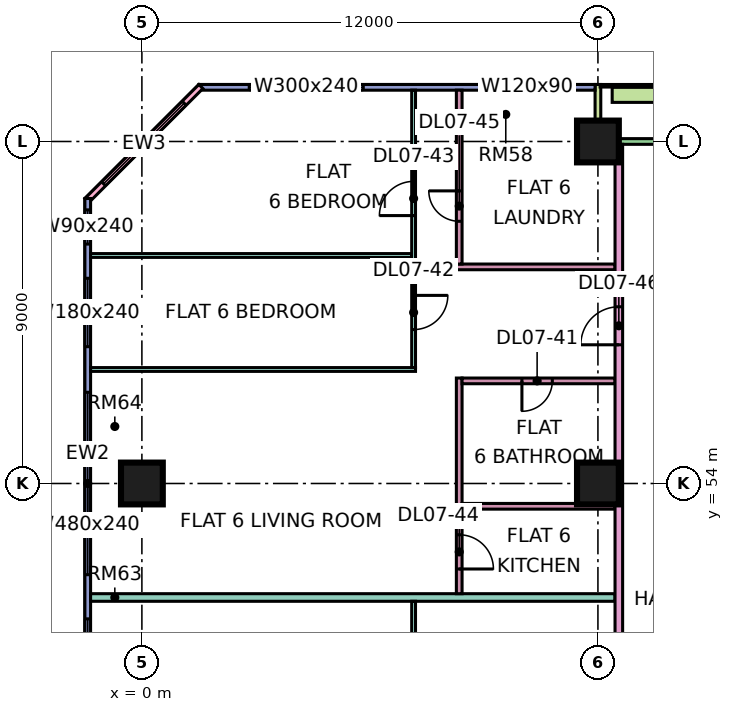
"""IFC4 building model, lengths in metres.
Left out: names, types, materials, properties, quantities, classifications, styles, units other than length and angle.
Written with IfcOpenShell. Run it as: python <this file> out.ifc"""

import sys

from ifc_helpers import new_model, si_unit, direction, frame, frame_2d, origin, origin_2d, place, context, subcontext, project, spatial, rectangle, extrude, element, fill, save


model = new_model("IFC4")
c1 = context("Model", 3, precision=1e-05, world=origin(), true_north=direction((0.0, 1.0)))
c2 = subcontext(c1, "Body", "Model", "MODEL_VIEW")
j1 = project(units=[si_unit("LENGTHUNIT", "METRE"), si_unit("PLANEANGLEUNIT", "RADIAN")], contexts=[c1])
p1 = place(None, origin())
s1 = spatial("IfcSite", under=j1, at=p1, CompositionType="ELEMENT")
p2 = place(p1, origin())
s2 = spatial("IfcBuilding", under=s1, at=p2, CompositionType="ELEMENT")
p3 = place(p2, frame((0.0, 0.0, 41.4)))
s3 = spatial("IfcBuildingStorey", under=s2, at=p3, CompositionType="ELEMENT", Elevation=41.4)
for number, where, z_axis, x_axis in (
    (1, (0.0, 54.0, 0.0), (0.0, 0.0, 1.0), (1.0, 0.0, 0.0)),
    (2, (12.0, 54.0, 0.0), (0.0, 0.0, 1.0), (1.0, 0.0, 0.0)),
    (3, (12.0, 63.0, 0.0), (0.0, 0.0, 1.0), (1.0, 0.0, 0.0)),
):
    element("IfcColumn", number, at=place(p3, frame(where, z_axis=z_axis, x_axis=x_axis)), inside=s3, PredefinedType="COLUMN", context=c2, shape_type="SweptSolid", body=[
        extrude(rectangle(XDim=1.1, YDim=1.1, at=origin_2d()), origin(), (0.0, 0.0, 1.0), 3.75),
    ])
p4 = place(p3, frame((22.425, 63.0, 0.0), z_axis=(0.0, 0.0, 1.0), x_axis=(-1.0, 0.0, 0.0)))
e4 = element("IfcWall", 4, at=p4, inside=s3, PredefinedType="SOLIDWALL", context=c2, shape_type="SweptSolid", body=[
    extrude(rectangle(XDim=10.35, YDim=0.15, at=frame_2d((5.175, 0.0))), origin(), (0.0, 0.0, 1.0), 3.35),
])
p5 = place(p4, frame((0.562, 0.0, 0.45)))
e5 = element("IfcOpeningElement", 5, at=p5, cuts=e4, PredefinedType="OPENING", context=c2, shape_type="SweptSolid", body=[
    extrude(rectangle(XDim=1.2, YDim=2.4, at=frame_2d((0.6, 1.2))), frame((0.0, 0.085, 0.0), z_axis=(0.0, -1.0, 0.0), x_axis=(1.0, 0.0, 0.0)), (0.0, 0.0, 1.0), 0.17),
])
p6 = place(p4, frame((3.975, 0.0, 0.45)))
e6 = element("IfcOpeningElement", 6, at=p6, cuts=e4, PredefinedType="OPENING", context=c2, shape_type="SweptSolid", body=[
    extrude(rectangle(XDim=2.4, YDim=2.4, at=frame_2d((1.2, 1.2))), frame((0.0, 0.085, 0.0), z_axis=(0.0, -1.0, 0.0), x_axis=(1.0, 0.0, 0.0)), (0.0, 0.0, 1.0), 0.17),
])
p7 = place(p3, frame((12.0, 64.5, 0.0), z_axis=(0.0, 0.0, 1.0), x_axis=(0.0, -1.0, 0.0)))
e7 = element("IfcWall", 7, at=p7, inside=s3, PredefinedType="SOLIDWALL", context=c2, shape_type="SweptSolid", body=[
    extrude(rectangle(XDim=1.5, YDim=0.15, at=frame_2d((0.75, 0.0))), origin(), (0.0, 0.0, 1.0), 3.35),
])
p8 = place(p3, frame((11.925, 64.425, 0.0), z_axis=(0.0, 0.0, 1.0), x_axis=(-1.0, 0.0, 0.0)))
e8 = element("IfcWall", 8, at=p8, inside=s3, PredefinedType="SOLIDWALL", context=c2, shape_type="SweptSolid", body=[
    extrude(rectangle(XDim=10.425, YDim=0.15, at=frame_2d((5.212, 0.0))), origin(), (0.0, 0.0, 1.0), 3.35),
])
p9 = place(p8, frame((1.188, 0.0, 1.7)))
e9 = element("IfcOpeningElement", 9, at=p9, cuts=e8, PredefinedType="OPENING", context=c2, shape_type="SweptSolid", body=[
    extrude(rectangle(XDim=1.2, YDim=0.9, at=frame_2d((0.6, 0.45))), frame((0.0, 0.085, 0.0), z_axis=(0.0, -1.0, 0.0), x_axis=(1.0, 0.0, 0.0)), (0.0, 0.0, 1.0), 0.17),
])
p10 = place(p8, frame((6.1, 0.0, 0.45)))
e10 = element("IfcOpeningElement", 10, at=p10, cuts=e8, PredefinedType="OPENING", context=c2, shape_type="SweptSolid", body=[
    extrude(rectangle(XDim=3.0, YDim=2.4, at=frame_2d((1.5, 1.2))), frame((0.0, 0.085, 0.0), z_axis=(0.0, -1.0, 0.0), x_axis=(1.0, 0.0, 0.0)), (0.0, 0.0, 1.0), 0.17),
])
p11 = place(p3, frame((1.553, 64.447, 0.0), z_axis=(0.0, 0.0, 1.0), x_axis=(-0.707106781187, -0.707106781187, 0.0)))
e11 = element("IfcWall", 11, at=p11, inside=s3, PredefinedType="SOLIDWALL", context=c2, shape_type="SweptSolid", body=[
    extrude(rectangle(XDim=4.243, YDim=0.15, at=frame_2d((2.121, 0.0))), origin(), (0.0, 0.0, 1.0), 3.35),
])
p12 = place(p11, frame((0.621, 0.0, 0.45)))
e12 = element("IfcOpeningElement", 12, at=p12, cuts=e11, PredefinedType="OPENING", context=c2, shape_type="SweptSolid", body=[
    extrude(rectangle(XDim=3.0, YDim=2.4, at=frame_2d((1.5, 1.2))), frame((0.0, 0.085, 0.0), z_axis=(0.0, -1.0, 0.0), x_axis=(1.0, 0.0, 0.0)), (0.0, 0.0, 1.0), 0.17),
])
p13 = place(p3, frame((-1.425, 61.5, 0.0), z_axis=(0.0, 0.0, 1.0), x_axis=(0.0, -1.0, 0.0)))
e13 = element("IfcWall", 13, at=p13, inside=s3, PredefinedType="SOLIDWALL", context=c2, shape_type="SweptSolid", body=[
    extrude(rectangle(XDim=13.425, YDim=0.15, at=frame_2d((6.712, 0.0))), origin(), (0.0, 0.0, 1.0), 3.35),
])
p14 = place(p13, frame((0.3, 0.0, 0.45)))
e14 = element("IfcOpeningElement", 14, at=p14, cuts=e13, PredefinedType="OPENING", context=c2, shape_type="SweptSolid", body=[
    extrude(rectangle(XDim=0.9, YDim=2.4, at=frame_2d((0.45, 1.2))), frame((0.0, 0.085, 0.0), z_axis=(0.0, -1.0, 0.0), x_axis=(1.0, 0.0, 0.0)), (0.0, 0.0, 1.0), 0.17),
])
p15 = place(p13, frame((2.1, 0.0, 0.45)))
e15 = element("IfcOpeningElement", 15, at=p15, cuts=e13, PredefinedType="OPENING", context=c2, shape_type="SweptSolid", body=[
    extrude(rectangle(XDim=1.8, YDim=2.4, at=frame_2d((0.9, 1.2))), frame((0.0, 0.085, 0.0), z_axis=(0.0, -1.0, 0.0), x_axis=(1.0, 0.0, 0.0)), (0.0, 0.0, 1.0), 0.17),
])
p16 = place(p13, frame((5.1, 0.0, 0.45)))
e16 = element("IfcOpeningElement", 16, at=p16, cuts=e13, PredefinedType="OPENING", context=c2, shape_type="SweptSolid", body=[
    extrude(rectangle(XDim=4.8, YDim=2.4, at=frame_2d((2.4, 1.2))), frame((0.0, 0.085, 0.0), z_axis=(0.0, -1.0, 0.0), x_axis=(1.0, 0.0, 0.0)), (0.0, 0.0, 1.0), 0.17),
])
p17 = place(p13, frame((11.062, 0.0, 0.45)))
e17 = element("IfcOpeningElement", 17, at=p17, cuts=e13, PredefinedType="OPENING", context=c2, shape_type="SweptSolid", body=[
    extrude(rectangle(XDim=1.8, YDim=2.4, at=frame_2d((0.9, 1.2))), frame((0.0, 0.085, 0.0), z_axis=(0.0, -1.0, 0.0), x_axis=(1.0, 0.0, 0.0)), (0.0, 0.0, 1.0), 0.17),
])
p18 = place(p3, frame((22.125, 64.229, 0.0), z_axis=(0.0, 0.0, 1.0), x_axis=(-1.0, 0.0, 0.0)))
e18 = element("IfcWall", 18, at=p18, inside=s3, PredefinedType="SOLIDWALL", context=c2, shape_type="SweptSolid", body=[
    extrude(rectangle(XDim=9.75, YDim=0.4, at=frame_2d((4.875, 0.0))), origin(), (0.0, 0.0, 1.0), 0.7),
])
p19 = place(p3, frame((-1.351, 60.0, 0.0), z_axis=(0.0, 0.0, 1.0), x_axis=(1.0, 0.0, 0.0)))
e19 = element("IfcWall", 19, at=p19, inside=s3, PredefinedType="PARTITIONING", context=c2, shape_type="SweptSolid", body=[
    extrude(rectangle(XDim=8.451, YDim=0.1, at=frame_2d((4.226, 0.0))), origin(), (0.0, 0.0, 1.0), 3.35),
])
p20 = place(p3, frame((-1.35, 51.0, 0.0), z_axis=(0.0, 0.0, 1.0), x_axis=(1.0, 0.0, 0.0)))
e20 = element("IfcWall", 20, at=p20, inside=s3, PredefinedType="PARTITIONING", context=c2, shape_type="SweptSolid", body=[
    extrude(rectangle(XDim=13.8, YDim=0.2, at=frame_2d((6.9, 0.0))), origin(), (0.0, 0.0, 1.0), 3.35),
])
p21 = place(p3, frame((-1.35, 57.0, 0.0), z_axis=(0.0, 0.0, 1.0), x_axis=(1.0, 0.0, 0.0)))
e21 = element("IfcWall", 21, at=p21, inside=s3, PredefinedType="PARTITIONING", context=c2, shape_type="SweptSolid", body=[
    extrude(rectangle(XDim=8.55, YDim=0.1, at=frame_2d((4.275, 0.0))), origin(), (0.0, 0.0, 1.0), 3.35),
])
p22 = place(p3, frame((7.15, 47.45, 0.0), z_axis=(0.0, 0.0, 1.0), x_axis=(0.0, 1.0, 0.0)))
e22 = element("IfcWall", 22, at=p22, inside=s3, PredefinedType="PARTITIONING", context=c2, shape_type="SweptSolid", body=[
    extrude(rectangle(XDim=3.45, YDim=0.1, at=frame_2d((1.725, 0.0))), origin(), (0.0, 0.0, 1.0), 3.35),
])
p23 = place(p3, frame((7.15, 57.05, 0.0), z_axis=(0.0, 0.0, 1.0), x_axis=(0.0, 1.0, 0.0)))
e23 = element("IfcWall", 23, at=p23, inside=s3, PredefinedType="PARTITIONING", context=c2, shape_type="SweptSolid", body=[
    extrude(rectangle(XDim=7.3, YDim=0.1, at=frame_2d((3.65, 0.0))), origin(), (0.0, 0.0, 1.0), 3.35),
])
p24 = place(p23, frame((1.0, 0.0, 0.0)))
e24 = element("IfcOpeningElement", 24, at=p24, cuts=e23, PredefinedType="OPENING", context=c2, shape_type="SweptSolid", body=[
    extrude(rectangle(XDim=0.9, YDim=2.1, at=frame_2d((0.45, 1.05))), frame((0.0, 0.06, 0.0), z_axis=(0.0, -1.0, 0.0), x_axis=(1.0, 0.0, 0.0)), (0.0, 0.0, 1.0), 0.12),
])
p25 = place(p23, frame((4.0, 0.0, 0.0)))
e25 = element("IfcOpeningElement", 25, at=p25, cuts=e23, PredefinedType="OPENING", context=c2, shape_type="SweptSolid", body=[
    extrude(rectangle(XDim=0.9, YDim=2.1, at=frame_2d((0.45, 1.05))), frame((0.0, 0.06, 0.0), z_axis=(0.0, -1.0, 0.0), x_axis=(1.0, 0.0, 0.0)), (0.0, 0.0, 1.0), 0.12),
])
p26 = place(p3, frame((8.275, 59.7, 0.0), z_axis=(0.0, 0.0, 1.0), x_axis=(1.0, 0.0, 0.0)))
e26 = element("IfcWall", 26, at=p26, inside=s3, PredefinedType="PARTITIONING", context=c2, shape_type="SweptSolid", body=[
    extrude(rectangle(XDim=4.175, YDim=0.15, at=frame_2d((2.087, 0.0))), origin(), (0.0, 0.0, 1.0), 3.35),
])
p27 = place(p3, frame((8.35, 51.1, 0.0), z_axis=(0.0, 0.0, 1.0), x_axis=(0.0, 1.0, 0.0)))
e27 = element("IfcWall", 27, at=p27, inside=s3, PredefinedType="PARTITIONING", context=c2, shape_type="SweptSolid", body=[
    extrude(rectangle(XDim=5.675, YDim=0.15, at=frame_2d((2.837, 0.0))), origin(), (0.0, 0.0, 1.0), 3.35),
])
p28 = place(p27, frame((0.65, 0.0, 0.0)))
e28 = element("IfcOpeningElement", 28, at=p28, cuts=e27, PredefinedType="OPENING", context=c2, shape_type="SweptSolid", body=[
    extrude(rectangle(XDim=0.9, YDim=2.1, at=frame_2d((0.45, 1.05))), frame((0.0, 0.085, 0.0), z_axis=(0.0, -1.0, 0.0), x_axis=(1.0, 0.0, 0.0)), (0.0, 0.0, 1.0), 0.17),
])
p29 = place(p3, frame((8.35, 59.775, 0.0), z_axis=(0.0, 0.0, 1.0), x_axis=(0.0, 1.0, 0.0)))
e29 = element("IfcWall", 29, at=p29, inside=s3, PredefinedType="PARTITIONING", context=c2, shape_type="SweptSolid", body=[
    extrude(rectangle(XDim=4.575, YDim=0.15, at=frame_2d((2.288, 0.0))), origin(), (0.0, 0.0, 1.0), 3.35),
])
p30 = place(p29, frame((1.125, 0.0, 0.0)))
e30 = element("IfcOpeningElement", 30, at=p30, cuts=e29, PredefinedType="OPENING", context=c2, shape_type="SweptSolid", body=[
    extrude(rectangle(XDim=0.8, YDim=2.1, at=frame_2d((0.4, 1.05))), frame((0.0, 0.085, 0.0), z_axis=(0.0, -1.0, 0.0), x_axis=(1.0, 0.0, 0.0)), (0.0, 0.0, 1.0), 0.17),
])
p31 = place(p3, frame((8.425, 53.4, 0.0), z_axis=(0.0, 0.0, 1.0), x_axis=(1.0, 0.0, 0.0)))
e31 = element("IfcWall", 31, at=p31, inside=s3, PredefinedType="PARTITIONING", context=c2, shape_type="SweptSolid", body=[
    extrude(rectangle(XDim=4.025, YDim=0.15, at=frame_2d((2.012, 0.0))), origin(), (0.0, 0.0, 1.0), 3.35),
])
p32 = place(p3, frame((8.425, 56.7, 0.0), z_axis=(0.0, 0.0, 1.0), x_axis=(1.0, 0.0, 0.0)))
e32 = element("IfcWall", 32, at=p32, inside=s3, PredefinedType="PARTITIONING", context=c2, shape_type="SweptSolid", body=[
    extrude(rectangle(XDim=4.025, YDim=0.15, at=frame_2d((2.012, 0.0))), origin(), (0.0, 0.0, 1.0), 3.35),
])
p33 = place(p32, frame((1.575, 0.0, 0.0)))
e33 = element("IfcOpeningElement", 33, at=p33, cuts=e32, PredefinedType="OPENING", context=c2, shape_type="SweptSolid", body=[
    extrude(rectangle(XDim=0.8, YDim=2.1, at=frame_2d((0.4, 1.05))), frame((0.0, 0.085, 0.0), z_axis=(0.0, -1.0, 0.0), x_axis=(1.0, 0.0, 0.0)), (0.0, 0.0, 1.0), 0.17),
])
p34 = place(p3, frame((12.55, 20.0, 0.0), z_axis=(0.0, 0.0, 1.0), x_axis=(0.0, 1.0, 0.0)))
e34 = element("IfcWall", 34, at=p34, inside=s3, PredefinedType="PARTITIONING", context=c2, shape_type="SweptSolid", body=[
    extrude(rectangle(XDim=42.926, YDim=0.2, at=frame_2d((21.463, 0.0))), origin(), (0.0, 0.0, 1.0), 3.35),
])
p35 = place(p34, frame((25.8, 0.0, 0.0)))
e35 = element("IfcOpeningElement", 35, at=p35, cuts=e34, PredefinedType="OPENING", context=c2, shape_type="SweptSolid", body=[
    extrude(rectangle(XDim=1.0, YDim=2.1, at=frame_2d((0.5, 1.05))), frame((0.0, 0.11, 0.0), z_axis=(0.0, -1.0, 0.0), x_axis=(1.0, 0.0, 0.0)), (0.0, 0.0, 1.0), 0.22),
])
p36 = place(p34, frame((37.65, 0.0, 0.0)))
e36 = element("IfcOpeningElement", 36, at=p36, cuts=e34, PredefinedType="OPENING", context=c2, shape_type="SweptSolid", body=[
    extrude(rectangle(XDim=1.0, YDim=2.1, at=frame_2d((0.5, 1.05))), frame((0.0, 0.11, 0.0), z_axis=(0.0, -1.0, 0.0), x_axis=(1.0, 0.0, 0.0)), (0.0, 0.0, 1.0), 0.22),
])
p37 = place(p34, frame((0.6, 0.0, 0.0)))
e37 = element("IfcOpeningElement", 37, at=p37, cuts=e34, PredefinedType="OPENING", context=c2, shape_type="SweptSolid", body=[
    extrude(rectangle(XDim=1.2, YDim=2.1, at=frame_2d((0.6, 1.05))), frame((0.0, 0.11, 0.0), z_axis=(0.0, -1.0, 0.0), x_axis=(1.0, 0.0, 0.0)), (0.0, 0.0, 1.0), 0.22),
])
p38 = place(p34, frame((4.65, 0.0, 0.0)))
e38 = element("IfcOpeningElement", 38, at=p38, cuts=e34, PredefinedType="OPENING", context=c2, shape_type="SweptSolid", body=[
    extrude(rectangle(XDim=1.0, YDim=2.1, at=frame_2d((0.5, 1.05))), frame((0.0, 0.11, 0.0), z_axis=(0.0, -1.0, 0.0), x_axis=(1.0, 0.0, 0.0)), (0.0, 0.0, 1.0), 0.22),
])
p39 = place(p9, origin())
e39 = element("IfcWindow", 39, at=p39, inside=s3, PartitioningType="SINGLE_PANEL", PredefinedType="WINDOW", context=c2, shape_type="SweptSolid", body=[
    extrude(rectangle(XDim=1.2, YDim=0.9, at=frame_2d((0.6, 0.45))), frame((0.0, 0.03, 0.0), z_axis=(0.0, -1.0, 0.0), x_axis=(1.0, 0.0, 0.0)), (0.0, 0.0, 1.0), 0.06),
])
fill(e9, e39)
p40 = place(p10, origin())
e40 = element("IfcWindow", 40, at=p40, inside=s3, PartitioningType="SINGLE_PANEL", PredefinedType="WINDOW", context=c2, shape_type="SweptSolid", body=[
    extrude(rectangle(XDim=3.0, YDim=2.4, at=frame_2d((1.5, 1.2))), frame((0.0, 0.03, 0.0), z_axis=(0.0, -1.0, 0.0), x_axis=(1.0, 0.0, 0.0)), (0.0, 0.0, 1.0), 0.06),
])
fill(e10, e40)
p41 = place(p12, origin())
e41 = element("IfcWindow", 41, at=p41, inside=s3, PartitioningType="SINGLE_PANEL", PredefinedType="WINDOW", context=c2, shape_type="SweptSolid", body=[
    extrude(rectangle(XDim=3.0, YDim=2.4, at=frame_2d((1.5, 1.2))), frame((0.0, 0.03, 0.0), z_axis=(0.0, -1.0, 0.0), x_axis=(1.0, 0.0, 0.0)), (0.0, 0.0, 1.0), 0.06),
])
fill(e12, e41)
p42 = place(p14, origin())
e42 = element("IfcWindow", 42, at=p42, inside=s3, PartitioningType="SINGLE_PANEL", PredefinedType="WINDOW", context=c2, shape_type="SweptSolid", body=[
    extrude(rectangle(XDim=0.9, YDim=2.4, at=frame_2d((0.45, 1.2))), frame((0.0, 0.03, 0.0), z_axis=(0.0, -1.0, 0.0), x_axis=(1.0, 0.0, 0.0)), (0.0, 0.0, 1.0), 0.06),
])
fill(e14, e42)
p43 = place(p15, origin())
e43 = element("IfcWindow", 43, at=p43, inside=s3, PartitioningType="SINGLE_PANEL", PredefinedType="WINDOW", context=c2, shape_type="SweptSolid", body=[
    extrude(rectangle(XDim=1.8, YDim=2.4, at=frame_2d((0.9, 1.2))), frame((0.0, 0.03, 0.0), z_axis=(0.0, -1.0, 0.0), x_axis=(1.0, 0.0, 0.0)), (0.0, 0.0, 1.0), 0.06),
])
fill(e15, e43)
p44 = place(p16, origin())
e44 = element("IfcWindow", 44, at=p44, inside=s3, PartitioningType="SINGLE_PANEL", PredefinedType="WINDOW", context=c2, shape_type="SweptSolid", body=[
    extrude(rectangle(XDim=4.8, YDim=2.4, at=frame_2d((2.4, 1.2))), frame((0.0, 0.03, 0.0), z_axis=(0.0, -1.0, 0.0), x_axis=(1.0, 0.0, 0.0)), (0.0, 0.0, 1.0), 0.06),
])
fill(e16, e44)
p45 = place(p17, origin())
e45 = element("IfcWindow", 45, at=p45, inside=s3, PartitioningType="SINGLE_PANEL", PredefinedType="WINDOW", context=c2, shape_type="SweptSolid", body=[
    extrude(rectangle(XDim=1.8, YDim=2.4, at=frame_2d((0.9, 1.2))), frame((0.0, 0.03, 0.0), z_axis=(0.0, -1.0, 0.0), x_axis=(1.0, 0.0, 0.0)), (0.0, 0.0, 1.0), 0.06),
])
fill(e17, e45)
p46 = place(p33, frame((0.8, 0.0, 0.0), z_axis=(0.0, 0.0, 1.0), x_axis=(-1.0, 0.0, 0.0)))
e46 = element("IfcDoor", 46, at=p46, inside=s3, OperationType="SINGLE_SWING_LEFT", PredefinedType="DOOR", context=c2, shape_type="SweptSolid", body=[
    extrude(rectangle(XDim=0.8, YDim=2.1, at=frame_2d((0.4, 1.05))), frame((0.0, 0.025, 0.0), z_axis=(0.0, -1.0, 0.0), x_axis=(1.0, 0.0, 0.0)), (0.0, 0.0, 1.0), 0.05),
])
fill(e33, e46)
p47 = place(p24, origin())
e47 = element("IfcDoor", 47, at=p47, inside=s3, OperationType="SINGLE_SWING_RIGHT", PredefinedType="DOOR", context=c2, shape_type="SweptSolid", body=[
    extrude(rectangle(XDim=0.9, YDim=2.1, at=frame_2d((0.45, 1.05))), frame((0.0, 0.025, 0.0), z_axis=(0.0, -1.0, 0.0), x_axis=(1.0, 0.0, 0.0)), (0.0, 0.0, 1.0), 0.05),
])
fill(e24, e47)
p48 = place(p25, origin())
e48 = element("IfcDoor", 48, at=p48, inside=s3, OperationType="SINGLE_SWING_LEFT", PredefinedType="DOOR", context=c2, shape_type="SweptSolid", body=[
    extrude(rectangle(XDim=0.9, YDim=2.1, at=frame_2d((0.45, 1.05))), frame((0.0, 0.025, 0.0), z_axis=(0.0, -1.0, 0.0), x_axis=(1.0, 0.0, 0.0)), (0.0, 0.0, 1.0), 0.05),
])
fill(e25, e48)
p49 = place(p28, frame((0.9, 0.0, 0.0), z_axis=(0.0, 0.0, 1.0), x_axis=(-1.0, 0.0, 0.0)))
e49 = element("IfcDoor", 49, at=p49, inside=s3, OperationType="SINGLE_SWING_LEFT", PredefinedType="DOOR", context=c2, shape_type="SweptSolid", body=[
    extrude(rectangle(XDim=0.9, YDim=2.1, at=frame_2d((0.45, 1.05))), frame((0.0, 0.025, 0.0), z_axis=(0.0, -1.0, 0.0), x_axis=(1.0, 0.0, 0.0)), (0.0, 0.0, 1.0), 0.05),
])
fill(e28, e49)
p50 = place(p30, frame((0.8, 0.0, 0.0), z_axis=(0.0, 0.0, 1.0), x_axis=(-1.0, 0.0, 0.0)))
e50 = element("IfcDoor", 50, at=p50, inside=s3, OperationType="SINGLE_SWING_RIGHT", PredefinedType="DOOR", context=c2, shape_type="SweptSolid", body=[
    extrude(rectangle(XDim=0.8, YDim=2.1, at=frame_2d((0.4, 1.05))), frame((0.0, 0.025, 0.0), z_axis=(0.0, -1.0, 0.0), x_axis=(1.0, 0.0, 0.0)), (0.0, 0.0, 1.0), 0.05),
])
fill(e30, e50)
p51 = place(p36, origin())
e51 = element("IfcDoor", 51, at=p51, inside=s3, OperationType="SINGLE_SWING_LEFT", PredefinedType="DOOR", context=c2, shape_type="SweptSolid", body=[
    extrude(rectangle(XDim=1.0, YDim=2.1, at=frame_2d((0.5, 1.05))), frame((0.0, 0.025, 0.0), z_axis=(0.0, -1.0, 0.0), x_axis=(1.0, 0.0, 0.0)), (0.0, 0.0, 1.0), 0.05),
])
fill(e36, e51)
save(model, sys.argv[1])
